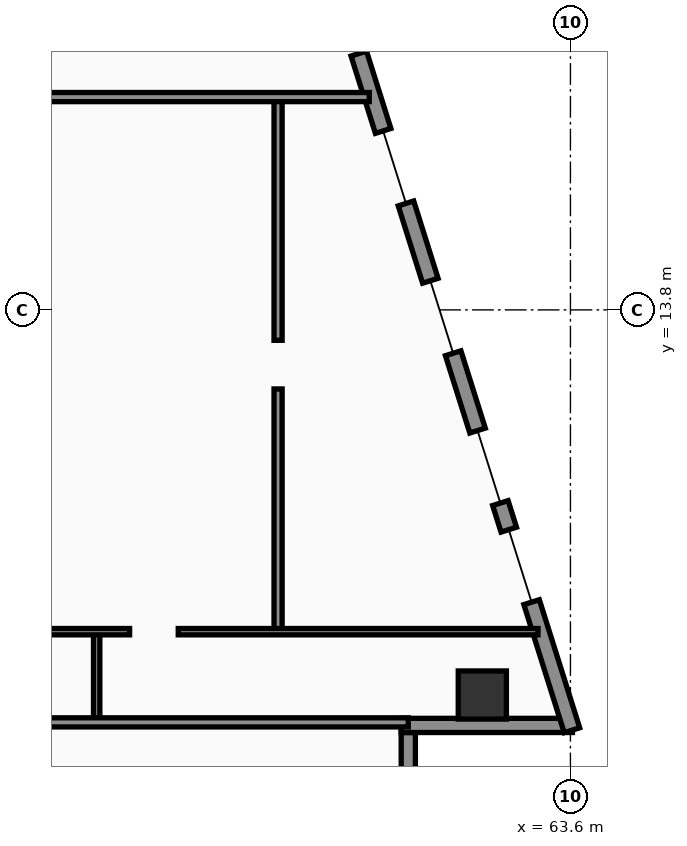
"""IFC4 building model, lengths in metres.
Left out: names, types, materials, properties, quantities, classifications, styles, units other than length and angle.
Written with IfcOpenShell. Run it as: python <this file> out.ifc"""

import sys

from ifc_helpers import new_model, si_unit, direction, frame, frame_2d, origin, origin_2d, place, context, subcontext, project, spatial, rectangle, hollow_rectangle, extrude, element, fill, save


model = new_model("IFC4")
c1 = context("Model", 3, precision=1e-05, world=origin(), true_north=direction((0.0, 1.0)))
c2 = subcontext(c1, "Body", "Model", "MODEL_VIEW")
j1 = project(units=[si_unit("LENGTHUNIT", "METRE"), si_unit("PLANEANGLEUNIT", "RADIAN")], contexts=[c1])
p1 = place(None, origin())
s1 = spatial("IfcSite", under=j1, at=p1, CompositionType="ELEMENT")
p2 = place(p1, origin())
s2 = spatial("IfcBuilding", under=s1, at=p2, CompositionType="ELEMENT")
p3 = place(p2, frame((0.0, 0.0, 66.0)))
s3 = spatial("IfcBuildingStorey", under=s2, at=p3, CompositionType="ELEMENT", Elevation=66.0)
p4 = place(p3, frame((61.861, 6.2, 0.0), z_axis=(0.0, 0.0, 1.0), x_axis=(1.0, 0.0, 0.0)))
e1 = element("IfcColumn", 1, at=p4, inside=s3, PredefinedType="COLUMN", context=c2, shape_type="SweptSolid", body=[
    extrude(hollow_rectangle(XDim=0.95, YDim=0.95, WallThickness=0.04, at=origin_2d()), origin(), (0.0, 0.0, 1.0), 3.56),
])
p5 = place(p3, frame((60.4, 2.52, 0.0), z_axis=(0.0, 0.0, 1.0), x_axis=(0.0, 1.0, 0.0)))
e2 = element("IfcWall", 2, at=p5, inside=s3, PredefinedType="SOLIDWALL", context=c2, shape_type="SweptSolid", body=[
    extrude(rectangle(XDim=2.94, YDim=0.28, at=frame_2d((1.47, 0.0))), origin(), (0.0, 0.0, 1.0), 3.04),
])
p6 = place(p3, frame((60.26, 5.6, 0.0), z_axis=(0.0, 0.0, 1.0), x_axis=(1.0, 0.0, 0.0)))
e3 = element("IfcWall", 3, at=p6, inside=s3, PredefinedType="SOLIDWALL", context=c2, shape_type="SweptSolid", body=[
    extrude(rectangle(XDim=3.38, YDim=0.28, at=frame_2d((1.69, 0.0))), origin(), (0.0, 0.0, 1.0), 3.04),
])
p7 = place(p3, frame((63.63, 5.505, 0.0), z_axis=(0.0, 0.0, 1.0), x_axis=(-0.300501856448, 0.953781229775, 0.0)))
e4 = element("IfcWall", 4, at=p7, inside=s3, PredefinedType="SOLIDWALL", context=c2, shape_type="SweptSolid", body=[
    extrude(rectangle(XDim=30.814, YDim=0.32, at=frame_2d((15.407, 0.0))), origin(), (0.0, 0.0, 1.0), 3.56),
])
p8 = place(p7, frame((18.796, 0.0, 0.0)))
e5 = element("IfcOpeningElement", 5, at=p8, cuts=e4, PredefinedType="OPENING", context=c2, shape_type="SweptSolid", body=[
    extrude(rectangle(XDim=1.4, YDim=2.25, at=frame_2d((0.7, 1.125))), frame((0.0, 0.17, 0.0), z_axis=(0.0, -1.0, 0.0), x_axis=(1.0, 0.0, 0.0)), (0.0, 0.0, 1.0), 0.34),
])
p9 = place(p7, frame((2.65, 0.0, 0.75)))
e6 = element("IfcOpeningElement", 6, at=p9, cuts=e4, PredefinedType="OPENING", context=c2, shape_type="SweptSolid", body=[
    extrude(rectangle(XDim=1.5, YDim=1.6, at=frame_2d((0.75, 0.8))), frame((0.0, 0.17, 0.0), z_axis=(0.0, -1.0, 0.0), x_axis=(1.0, 0.0, 0.0)), (0.0, 0.0, 1.0), 0.34),
])
p10 = place(p7, frame((4.7, 0.0, 0.75)))
e7 = element("IfcOpeningElement", 7, at=p10, cuts=e4, PredefinedType="OPENING", context=c2, shape_type="SweptSolid", body=[
    extrude(rectangle(XDim=1.5, YDim=1.6, at=frame_2d((0.75, 0.8))), frame((0.0, 0.17, 0.0), z_axis=(0.0, -1.0, 0.0), x_axis=(1.0, 0.0, 0.0)), (0.0, 0.0, 1.0), 0.34),
])
p11 = place(p7, frame((7.8, 0.0, 0.75)))
e8 = element("IfcOpeningElement", 8, at=p11, cuts=e4, PredefinedType="OPENING", context=c2, shape_type="SweptSolid", body=[
    extrude(rectangle(XDim=1.5, YDim=1.6, at=frame_2d((0.75, 0.8))), frame((0.0, 0.17, 0.0), z_axis=(0.0, -1.0, 0.0), x_axis=(1.0, 0.0, 0.0)), (0.0, 0.0, 1.0), 0.34),
])
p12 = place(p7, frame((10.9, 0.0, 0.75)))
e9 = element("IfcOpeningElement", 9, at=p12, cuts=e4, PredefinedType="OPENING", context=c2, shape_type="SweptSolid", body=[
    extrude(rectangle(XDim=1.5, YDim=1.6, at=frame_2d((0.75, 0.8))), frame((0.0, 0.17, 0.0), z_axis=(0.0, -1.0, 0.0), x_axis=(1.0, 0.0, 0.0)), (0.0, 0.0, 1.0), 0.34),
])
p13 = place(p7, frame((14.0, 0.0, 0.75)))
e10 = element("IfcOpeningElement", 10, at=p13, cuts=e4, PredefinedType="OPENING", context=c2, shape_type="SweptSolid", body=[
    extrude(rectangle(XDim=1.5, YDim=1.6, at=frame_2d((0.75, 0.8))), frame((0.0, 0.17, 0.0), z_axis=(0.0, -1.0, 0.0), x_axis=(1.0, 0.0, 0.0)), (0.0, 0.0, 1.0), 0.34),
])
p14 = place(p7, frame((16.55, 0.0, 0.75)))
e11 = element("IfcOpeningElement", 11, at=p14, cuts=e4, PredefinedType="OPENING", context=c2, shape_type="SweptSolid", body=[
    extrude(rectangle(XDim=1.5, YDim=1.6, at=frame_2d((0.75, 0.8))), frame((0.0, 0.17, 0.0), z_axis=(0.0, -1.0, 0.0), x_axis=(1.0, 0.0, 0.0)), (0.0, 0.0, 1.0), 0.34),
])
p15 = place(p7, frame((20.75, 0.0, 0.75)))
e12 = element("IfcOpeningElement", 12, at=p15, cuts=e4, PredefinedType="OPENING", context=c2, shape_type="SweptSolid", body=[
    extrude(rectangle(XDim=1.5, YDim=1.6, at=frame_2d((0.75, 0.8))), frame((0.0, 0.17, 0.0), z_axis=(0.0, -1.0, 0.0), x_axis=(1.0, 0.0, 0.0)), (0.0, 0.0, 1.0), 0.34),
])
p16 = place(p7, frame((23.3, 0.0, 0.75)))
e13 = element("IfcOpeningElement", 13, at=p16, cuts=e4, PredefinedType="OPENING", context=c2, shape_type="SweptSolid", body=[
    extrude(rectangle(XDim=1.5, YDim=1.6, at=frame_2d((0.75, 0.8))), frame((0.0, 0.17, 0.0), z_axis=(0.0, -1.0, 0.0), x_axis=(1.0, 0.0, 0.0)), (0.0, 0.0, 1.0), 0.34),
])
p17 = place(p7, frame((26.4, 0.0, 0.75)))
e14 = element("IfcOpeningElement", 14, at=p17, cuts=e4, PredefinedType="OPENING", context=c2, shape_type="SweptSolid", body=[
    extrude(rectangle(XDim=1.5, YDim=1.6, at=frame_2d((0.75, 0.8))), frame((0.0, 0.17, 0.0), z_axis=(0.0, -1.0, 0.0), x_axis=(1.0, 0.0, 0.0)), (0.0, 0.0, 1.0), 0.34),
])
p18 = place(p3, frame((54.25, 5.66, 0.0), z_axis=(0.0, 0.0, 1.0), x_axis=(0.0, 1.0, 0.0)))
e15 = element("IfcWall", 15, at=p18, inside=s3, PredefinedType="PARTITIONING", context=c2, shape_type="SweptSolid", body=[
    extrude(rectangle(XDim=1.79, YDim=0.125, at=frame_2d((0.895, 0.0))), origin(), (0.0, 0.0, 1.0), 3.56),
])
p19 = place(p3, frame((57.83, 7.45, 0.0), z_axis=(0.0, 0.0, 1.0), x_axis=(0.0, 1.0, 0.0)))
e16 = element("IfcWall", 16, at=p19, inside=s3, PredefinedType="PARTITIONING", context=c2, shape_type="SweptSolid", body=[
    extrude(rectangle(XDim=10.55, YDim=0.16, at=frame_2d((5.275, 0.0))), origin(), (0.0, 0.0, 1.0), 3.04),
])
p20 = place(p19, frame((4.79, 0.0, 0.0)))
e17 = element("IfcOpeningElement", 17, at=p20, cuts=e16, PredefinedType="OPENING", context=c2, shape_type="SweptSolid", body=[
    extrude(rectangle(XDim=0.96, YDim=2.2, at=frame_2d((0.48, 1.1))), frame((0.0, 0.09, 0.0), z_axis=(0.0, -1.0, 0.0), x_axis=(1.0, 0.0, 0.0)), (0.0, 0.0, 1.0), 0.18),
])
p21 = place(p3, frame((51.3, 7.45, 0.0), z_axis=(0.0, 0.0, 1.0), x_axis=(1.0, 0.0, 0.0)))
e18 = element("IfcWall", 18, at=p21, inside=s3, PredefinedType="PARTITIONING", context=c2, shape_type="SweptSolid", body=[
    extrude(rectangle(XDim=11.66, YDim=0.125, at=frame_2d((5.83, 0.0))), origin(), (0.0, 0.0, 1.0), 3.04),
])
p22 = place(p21, frame((0.5, 0.0, 0.0)))
e19 = element("IfcOpeningElement", 19, at=p22, cuts=e18, PredefinedType="OPENING", context=c2, shape_type="SweptSolid", body=[
    extrude(rectangle(XDim=0.9, YDim=2.15, at=frame_2d((0.45, 1.075))), frame((0.0, 0.073, 0.0), z_axis=(0.0, -1.0, 0.0), x_axis=(1.0, 0.0, 0.0)), (0.0, 0.0, 1.0), 0.145),
])
p23 = place(p21, frame((3.6, 0.0, 0.0)))
e20 = element("IfcOpeningElement", 20, at=p23, cuts=e18, PredefinedType="OPENING", context=c2, shape_type="SweptSolid", body=[
    extrude(rectangle(XDim=0.96, YDim=2.2, at=frame_2d((0.48, 1.1))), frame((0.0, 0.073, 0.0), z_axis=(0.0, -1.0, 0.0), x_axis=(1.0, 0.0, 0.0)), (0.0, 0.0, 1.0), 0.145),
])
p24 = place(p3, frame((51.3, 5.66, 0.0), z_axis=(0.0, 0.0, 1.0), x_axis=(1.0, 0.0, 0.0)))
e21 = element("IfcWall", 21, at=p24, inside=s3, PredefinedType="PARTITIONING", context=c2, shape_type="SweptSolid", body=[
    extrude(rectangle(XDim=9.1, YDim=0.18, at=frame_2d((4.55, 0.0))), origin(), (0.0, 0.0, 1.0), 3.04),
])
p25 = place(p3, frame((51.3, 18.0, 0.0), z_axis=(0.0, 0.0, 1.0), x_axis=(1.0, 0.0, 0.0)))
e22 = element("IfcWall", 22, at=p25, inside=s3, PredefinedType="PARTITIONING", context=c2, shape_type="SweptSolid", body=[
    extrude(rectangle(XDim=8.33, YDim=0.18, at=frame_2d((4.165, 0.0))), origin(), (0.0, 0.0, 1.0), 3.04),
])
p26 = place(p9, origin())
e23 = element("IfcWindow", 23, at=p26, inside=s3, PartitioningType="SINGLE_PANEL", PredefinedType="WINDOW", context=c2, shape_type="SweptSolid", body=[
    extrude(rectangle(XDim=1.5, YDim=1.6, at=frame_2d((0.75, 0.8))), frame((0.0, 0.03, 0.0), z_axis=(0.0, -1.0, 0.0), x_axis=(1.0, 0.0, 0.0)), (0.0, 0.0, 1.0), 0.06),
])
fill(e6, e23)
p27 = place(p10, origin())
e24 = element("IfcWindow", 24, at=p27, inside=s3, PartitioningType="SINGLE_PANEL", PredefinedType="WINDOW", context=c2, shape_type="SweptSolid", body=[
    extrude(rectangle(XDim=1.5, YDim=1.6, at=frame_2d((0.75, 0.8))), frame((0.0, 0.03, 0.0), z_axis=(0.0, -1.0, 0.0), x_axis=(1.0, 0.0, 0.0)), (0.0, 0.0, 1.0), 0.06),
])
fill(e7, e24)
p28 = place(p11, origin())
e25 = element("IfcWindow", 25, at=p28, inside=s3, PartitioningType="SINGLE_PANEL", PredefinedType="WINDOW", context=c2, shape_type="SweptSolid", body=[
    extrude(rectangle(XDim=1.5, YDim=1.6, at=frame_2d((0.75, 0.8))), frame((0.0, 0.03, 0.0), z_axis=(0.0, -1.0, 0.0), x_axis=(1.0, 0.0, 0.0)), (0.0, 0.0, 1.0), 0.06),
])
fill(e8, e25)
p29 = place(p12, origin())
e26 = element("IfcWindow", 26, at=p29, inside=s3, PartitioningType="SINGLE_PANEL", PredefinedType="WINDOW", context=c2, shape_type="SweptSolid", body=[
    extrude(rectangle(XDim=1.5, YDim=1.6, at=frame_2d((0.75, 0.8))), frame((0.0, 0.03, 0.0), z_axis=(0.0, -1.0, 0.0), x_axis=(1.0, 0.0, 0.0)), (0.0, 0.0, 1.0), 0.06),
])
fill(e9, e26)
p30 = place(p13, origin())
e27 = element("IfcWindow", 27, at=p30, inside=s3, PartitioningType="SINGLE_PANEL", PredefinedType="WINDOW", context=c2, shape_type="SweptSolid", body=[
    extrude(rectangle(XDim=1.5, YDim=1.6, at=frame_2d((0.75, 0.8))), frame((0.0, 0.03, 0.0), z_axis=(0.0, -1.0, 0.0), x_axis=(1.0, 0.0, 0.0)), (0.0, 0.0, 1.0), 0.06),
])
fill(e10, e27)
p31 = place(p20, origin())
e28 = element("IfcDoor", 28, at=p31, inside=s3, OperationType="SINGLE_SWING_LEFT", PredefinedType="DOOR", context=c2, shape_type="SweptSolid", body=[
    extrude(rectangle(XDim=0.96, YDim=2.2, at=frame_2d((0.48, 1.1))), frame((0.0, 0.025, 0.0), z_axis=(0.0, -1.0, 0.0), x_axis=(1.0, 0.0, 0.0)), (0.0, 0.0, 1.0), 0.05),
])
fill(e17, e28)
p32 = place(p23, origin())
e29 = element("IfcDoor", 29, at=p32, inside=s3, OperationType="SINGLE_SWING_RIGHT", PredefinedType="DOOR", context=c2, shape_type="SweptSolid", body=[
    extrude(rectangle(XDim=0.96, YDim=2.2, at=frame_2d((0.48, 1.1))), frame((0.0, 0.025, 0.0), z_axis=(0.0, -1.0, 0.0), x_axis=(1.0, 0.0, 0.0)), (0.0, 0.0, 1.0), 0.05),
])
fill(e20, e29)
save(model, sys.argv[1])
